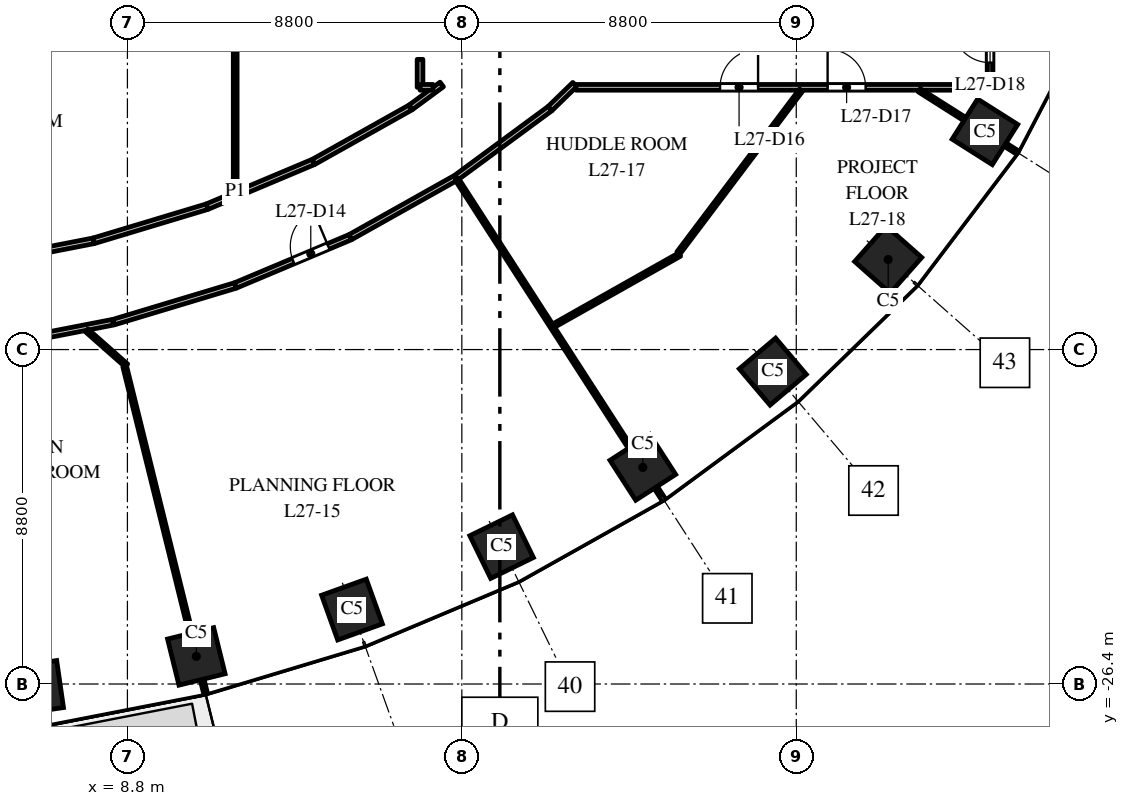
"""IFC4 building model, lengths in metres.
Left out: names, types, materials, properties, quantities, classifications, styles, units other than length and angle.
Written with IfcOpenShell. Run it as: python <this file> out.ifc"""

import sys

from ifc_helpers import new_model, si_unit, direction, frame, frame_2d, origin, origin_2d, place, context, subcontext, project, spatial, rectangle, extrude, element, fill, save


model = new_model("IFC4")
c1 = context("Model", 3, precision=1e-05, world=origin(), true_north=direction((0.0, 1.0)))
c2 = subcontext(c1, "Body", "Model", "MODEL_VIEW")
j1 = project(units=[si_unit("LENGTHUNIT", "METRE"), si_unit("PLANEANGLEUNIT", "RADIAN")], contexts=[c1])
p1 = place(None, origin())
s1 = spatial("IfcSite", under=j1, at=p1, CompositionType="ELEMENT")
p2 = place(p1, origin())
s2 = spatial("IfcBuilding", under=s1, at=p2, CompositionType="ELEMENT")
p3 = place(p2, frame((0.0, 0.0, 120.0)))
s3 = spatial("IfcBuildingStorey", under=s2, at=p3, CompositionType="ELEMENT", Elevation=120.0)
for number, where, z_axis, x_axis in (
    (1, (6.409, -26.491, 0.0), (0.0, 0.0, 1.0), (0.99, 0.143, 0.0)),
    (2, (10.613, -25.674, 0.0), (0.0, 0.0, 1.0), (0.971, 0.24, 0.0)),
    (3, (14.709, -24.441, 0.0), (0.0, 0.0, 1.0), (0.941, 0.338, 0.0)),
    (4, (18.646, -22.785, 0.0), (0.0, 0.0, 1.0), (0.898, 0.439, 0.0)),
    (5, (22.362, -20.7, 0.0), (0.0, 0.0, 1.0), (0.84, 0.542, 0.0)),
    (6, (25.783, -18.18, 0.0), (0.0, 0.0, 1.0), (0.763, 0.646, 0.0)),
    (7, (28.819, -15.23, 0.0), (0.0, 0.0, 1.0), (0.663, 0.749, 0.0)),
    (8, (31.365, -11.871, 0.0), (0.0, 0.0, 1.0), (0.535, 0.845, 0.0)),
):
    element("IfcColumn", number, at=place(p3, frame(where, z_axis=z_axis, x_axis=x_axis)), inside=s3, PredefinedType="COLUMN", context=c2, shape_type="SweptSolid", body=[
        extrude(rectangle(XDim=1.25, YDim=1.25, at=origin_2d()), origin(), (0.0, 0.0, 1.0), 4.0),
    ])
p4 = place(p3, frame((4.798, -15.344, 0.0), z_axis=(0.0, 0.0, 1.0), x_axis=(0.981588545092, 0.191007665145, 0.0)))
e9 = element("IfcWall", 9, at=p4, inside=s3, PredefinedType="PARTITIONING", context=c2, shape_type="SweptSolid", body=[
    extrude(rectangle(XDim=3.172, YDim=0.15, at=frame_2d((1.586, 0.0))), origin(), (0.0, 0.0, 1.0), 3.7),
])
p5 = place(p3, frame((5.113, -17.523, 0.0), z_axis=(0.0, 0.0, 1.0), x_axis=(0.981690354374, 0.19048372143, 0.0)))
e10 = element("IfcWall", 10, at=p5, inside=s3, PredefinedType="PARTITIONING", context=c2, shape_type="SweptSolid", body=[
    extrude(rectangle(XDim=3.37, YDim=0.15, at=frame_2d((1.685, 0.0))), origin(), (0.0, 0.0, 1.0), 3.7),
])
p6 = place(p3, frame((7.728, -17.095, 0.0), z_axis=(0.0, 0.0, 1.0), x_axis=(0.749403770292, -0.662113275106, 0.0)))
e11 = element("IfcWall", 11, at=p6, inside=s3, PredefinedType="PARTITIONING", context=c2, shape_type="SweptSolid", body=[
    extrude(rectangle(XDim=1.396, YDim=0.1, at=frame_2d((0.698, 0.0))), origin(), (0.0, 0.0, 1.0), 3.7),
])
p7 = place(p3, frame((7.912, -14.738, 0.0), z_axis=(0.0, 0.0, 1.0), x_axis=(0.957606118849, 0.28808075455, 0.0)))
e12 = element("IfcWall", 12, at=p7, inside=s3, PredefinedType="PARTITIONING", context=c2, shape_type="SweptSolid", body=[
    extrude(rectangle(XDim=3.117, YDim=0.15, at=frame_2d((1.559, 0.0))), origin(), (0.0, 0.0, 1.0), 2.85),
])
p8 = place(p3, frame((8.44, -16.877, 0.0), z_axis=(0.0, 0.0, 1.0), x_axis=(0.957584891346, 0.288151307243, 0.0)))
e13 = element("IfcWall", 13, at=p8, inside=s3, PredefinedType="PARTITIONING", context=c2, shape_type="SweptSolid", body=[
    extrude(rectangle(XDim=3.345, YDim=0.15, at=frame_2d((1.672, 0.0))), origin(), (0.0, 0.0, 1.0), 2.85),
])
p9 = place(p3, frame((8.729, -18.046, 0.0), z_axis=(0.0, 0.0, 1.0), x_axis=(0.240109518445, -0.970745805632, 0.0)))
e14 = element("IfcWall", 14, at=p9, inside=s3, PredefinedType="PARTITIONING", context=c2, shape_type="SweptSolid", body=[
    extrude(rectangle(XDim=8.858, YDim=0.1, at=frame_2d((4.429, 0.0))), origin(), (0.0, 0.0, 1.0), 2.9),
])
p10 = place(p3, frame((10.897, -13.84, 0.0), z_axis=(0.0, 0.0, 1.0), x_axis=(0.921751821358, 0.387780324183, 0.0)))
e15 = element("IfcWall", 15, at=p10, inside=s3, PredefinedType="PARTITIONING", context=c2, shape_type="SweptSolid", body=[
    extrude(rectangle(XDim=3.038, YDim=0.15, at=frame_2d((1.519, 0.0))), origin(), (0.0, 0.0, 1.0), 3.7),
])
p11 = place(p3, frame((11.636, -13.444, 0.0), z_axis=(0.0, 0.0, 1.0), x_axis=(0.0, 1.0, 0.0)))
e16 = element("IfcWall", 16, at=p11, inside=s3, PredefinedType="PARTITIONING", context=c2, shape_type="SweptSolid", body=[
    extrude(rectangle(XDim=26.888, YDim=0.1, at=frame_2d((13.444, 0.0))), origin(), (0.0, 0.0, 1.0), 2.75),
])
p12 = place(p3, frame((11.643, -15.913, 0.0), z_axis=(0.0, 0.0, 1.0), x_axis=(0.921789499058, 0.38769075231, 0.0)))
e17 = element("IfcWall", 17, at=p12, inside=s3, PredefinedType="PARTITIONING", context=c2, shape_type="SweptSolid", body=[
    extrude(rectangle(XDim=3.278, YDim=0.15, at=frame_2d((1.639, 0.0))), origin(), (0.0, 0.0, 1.0), 3.7),
])
p13 = place(p12, frame((1.65, 0.0, 0.0)))
e18 = element("IfcOpeningElement", 18, at=p13, cuts=e17, PredefinedType="OPENING", context=c2, shape_type="SweptSolid", body=[
    extrude(rectangle(XDim=1.0, YDim=2.1, at=frame_2d((0.5, 1.05))), frame((0.0, 0.085, 0.0), z_axis=(0.0, -1.0, 0.0), x_axis=(1.0, 0.0, 0.0)), (0.0, 0.0, 1.0), 0.17),
])
p14 = place(p3, frame((13.697, -12.662, 0.0), z_axis=(0.0, 0.0, 1.0), x_axis=(0.872147381065, 0.489243237767, 0.0)))
e19 = element("IfcWall", 19, at=p14, inside=s3, PredefinedType="PARTITIONING", context=c2, shape_type="SweptSolid", body=[
    extrude(rectangle(XDim=2.927, YDim=0.15, at=frame_2d((1.464, 0.0))), origin(), (0.0, 0.0, 1.0), 3.7),
])
p15 = place(p3, frame((14.665, -14.642, 0.0), z_axis=(0.0, 0.0, 1.0), x_axis=(0.871997056828, 0.4895111162, 0.0)))
e20 = element("IfcWall", 20, at=p15, inside=s3, PredefinedType="PARTITIONING", context=c2, shape_type="SweptSolid", body=[
    extrude(rectangle(XDim=3.168, YDim=0.15, at=frame_2d((1.584, 0.0))), origin(), (0.0, 0.0, 1.0), 3.7),
])
p16 = place(p3, frame((16.25, -11.23, 0.0), z_axis=(0.0, 0.0, 1.0), x_axis=(0.805055837353, 0.59319903805, 0.0)))
e21 = element("IfcWall", 21, at=p16, inside=s3, PredefinedType="PARTITIONING", context=c2, shape_type="SweptSolid", body=[
    extrude(rectangle(XDim=1.02, YDim=0.15, at=frame_2d((0.51, 0.0))), origin(), (0.0, 0.0, 1.0), 3.7),
])
p17 = place(p3, frame((16.5, -10.7, 0.0), z_axis=(0.0, 0.0, 1.0), x_axis=(0.0, 1.0, 0.0)))
e22 = element("IfcWall", 22, at=p17, inside=s3, PredefinedType="PARTITIONING", context=c2, shape_type="SweptSolid", body=[
    extrude(rectangle(XDim=0.736, YDim=0.15, at=frame_2d((0.368, 0.0))), origin(), (0.0, 0.0, 1.0), 3.7),
])
p18 = place(p3, frame((16.5, -10.7, 0.0), z_axis=(0.0, 0.0, 1.0), x_axis=(1.0, 0.0, 0.0)))
e23 = element("IfcWall", 23, at=p18, inside=s3, PredefinedType="PARTITIONING", context=c2, shape_type="SweptSolid", body=[
    extrude(rectangle(XDim=0.343, YDim=0.15, at=frame_2d((0.171, 0.0))), origin(), (0.0, 0.0, 1.0), 3.7),
])
p19 = place(p3, frame((17.447, -13.085, 0.0), z_axis=(0.0, 0.0, 1.0), x_axis=(0.542325736183, -0.840168314015, 0.0)))
e24 = element("IfcWall", 24, at=p19, inside=s3, PredefinedType="PARTITIONING", context=c2, shape_type="SweptSolid", body=[
    extrude(rectangle(XDim=10.066, YDim=0.1, at=frame_2d((5.033, 0.0))), origin(), (0.0, 0.0, 1.0), 3.7),
])
p20 = place(p3, frame((17.461, -13.07, 0.0), z_axis=(0.0, 0.0, 1.0), x_axis=(0.805228684186, 0.592964388613, 0.0)))
e25 = element("IfcWall", 25, at=p20, inside=s3, PredefinedType="PARTITIONING", context=c2, shape_type="SweptSolid", body=[
    extrude(rectangle(XDim=3.052, YDim=0.15, at=frame_2d((1.526, 0.0))), origin(), (0.0, 0.0, 1.0), 3.7),
])
p21 = place(p3, frame((19.919, -11.26, 0.0), z_axis=(0.0, 0.0, 1.0), x_axis=(0.716953986293, 0.697120492841, 0.0)))
e26 = element("IfcWall", 26, at=p21, inside=s3, PredefinedType="PARTITIONING", context=c2, shape_type="SweptSolid", body=[
    extrude(rectangle(XDim=0.911, YDim=0.15, at=frame_2d((0.456, 0.0))), origin(), (0.0, 0.0, 1.0), 2.75),
])
p22 = place(p3, frame((20.015, -16.97, 0.0), z_axis=(0.0, 0.0, 1.0), x_axis=(0.871018559545, 0.491250108324, 0.0)))
e27 = element("IfcWall", 27, at=p22, inside=s3, PredefinedType="PARTITIONING", context=c2, shape_type="SweptSolid", body=[
    extrude(rectangle(XDim=3.808, YDim=0.1, at=frame_2d((1.904, 0.0))), origin(), (0.0, 0.0, 1.0), 3.7),
])
p23 = place(p3, frame((20.603, -10.7, 0.0), z_axis=(0.0, 0.0, 1.0), x_axis=(1.0, 0.0, 0.0)))
e28 = element("IfcWall", 28, at=p23, inside=s3, PredefinedType="PARTITIONING", context=c2, shape_type="SweptSolid", body=[
    extrude(rectangle(XDim=10.897, YDim=0.15, at=frame_2d((5.448, 0.0))), origin(), (0.0, 0.0, 1.0), 2.9),
])
p24 = place(p23, frame((3.792, 0.0, 0.0)))
e29 = element("IfcOpeningElement", 29, at=p24, cuts=e28, PredefinedType="OPENING", context=c2, shape_type="SweptSolid", body=[
    extrude(rectangle(XDim=1.0, YDim=2.1, at=frame_2d((0.5, 1.05))), frame((0.0, 0.085, 0.0), z_axis=(0.0, -1.0, 0.0), x_axis=(1.0, 0.0, 0.0)), (0.0, 0.0, 1.0), 0.17),
])
p25 = place(p23, frame((6.622, 0.0, 0.0)))
e30 = element("IfcOpeningElement", 30, at=p25, cuts=e28, PredefinedType="OPENING", context=c2, shape_type="SweptSolid", body=[
    extrude(rectangle(XDim=1.0, YDim=2.1, at=frame_2d((0.5, 1.05))), frame((0.0, 0.085, 0.0), z_axis=(0.0, -1.0, 0.0), x_axis=(1.0, 0.0, 0.0)), (0.0, 0.0, 1.0), 0.17),
])
p26 = place(p3, frame((23.298, -15.06, 0.0), z_axis=(0.0, 0.0, 1.0), x_axis=(0.601658833238, 0.798753183647, 0.0)))
e31 = element("IfcWall", 31, at=p26, inside=s3, PredefinedType="PARTITIONING", context=c2, shape_type="SweptSolid", body=[
    extrude(rectangle(XDim=5.365, YDim=0.1, at=frame_2d((2.682, 0.0))), origin(), (0.0, 0.0, 1.0), 2.75),
])
p27 = place(p3, frame((29.637, -10.777, 0.0), z_axis=(0.0, 0.0, 1.0), x_axis=(0.844810627195, -0.535065420467, 0.0)))
e32 = element("IfcWall", 32, at=p27, inside=s3, PredefinedType="PARTITIONING", context=c2, shape_type="SweptSolid", body=[
    extrude(rectangle(XDim=3.048, YDim=0.1, at=frame_2d((1.524, 0.0))), origin(), (0.0, 0.0, 1.0), 2.9),
])
p28 = place(p3, frame((31.5, -10.7, 0.0), z_axis=(0.0, 0.0, 1.0), x_axis=(0.0, 1.0, 0.0)))
e33 = element("IfcWall", 33, at=p28, inside=s3, PredefinedType="PARTITIONING", context=c2, shape_type="SweptSolid", body=[
    extrude(rectangle(XDim=2.2, YDim=0.15, at=frame_2d((1.1, 0.0))), origin(), (0.0, 0.0, 1.0), 2.9),
])
p29 = place(p28, frame((0.65, 0.0, 0.0)))
e34 = element("IfcOpeningElement", 34, at=p29, cuts=e33, PredefinedType="OPENING", context=c2, shape_type="SweptSolid", body=[
    extrude(rectangle(XDim=1.0, YDim=2.1, at=frame_2d((0.5, 1.05))), frame((0.0, 0.085, 0.0), z_axis=(0.0, -1.0, 0.0), x_axis=(1.0, 0.0, 0.0)), (0.0, 0.0, 1.0), 0.17),
])
p30 = place(p13, origin())
e35 = element("IfcDoor", 35, at=p30, inside=s3, OperationType="SINGLE_SWING_RIGHT", PredefinedType="DOOR", context=c2, shape_type="SweptSolid", body=[
    extrude(rectangle(XDim=1.0, YDim=2.1, at=frame_2d((0.5, 1.05))), frame((0.0, 0.025, 0.0), z_axis=(0.0, -1.0, 0.0), x_axis=(1.0, 0.0, 0.0)), (0.0, 0.0, 1.0), 0.05),
])
fill(e18, e35)
p31 = place(p24, origin())
e36 = element("IfcDoor", 36, at=p31, inside=s3, OperationType="SINGLE_SWING_RIGHT", PredefinedType="DOOR", context=c2, shape_type="SweptSolid", body=[
    extrude(rectangle(XDim=1.0, YDim=2.1, at=frame_2d((0.5, 1.05))), frame((0.0, 0.025, 0.0), z_axis=(0.0, -1.0, 0.0), x_axis=(1.0, 0.0, 0.0)), (0.0, 0.0, 1.0), 0.05),
])
fill(e29, e36)
p32 = place(p25, origin())
e37 = element("IfcDoor", 37, at=p32, inside=s3, OperationType="SINGLE_SWING_LEFT", PredefinedType="DOOR", context=c2, shape_type="SweptSolid", body=[
    extrude(rectangle(XDim=1.0, YDim=2.1, at=frame_2d((0.5, 1.05))), frame((0.0, 0.025, 0.0), z_axis=(0.0, -1.0, 0.0), x_axis=(1.0, 0.0, 0.0)), (0.0, 0.0, 1.0), 0.05),
])
fill(e30, e37)
p33 = place(p29, origin())
e38 = element("IfcDoor", 38, at=p33, inside=s3, OperationType="SINGLE_SWING_RIGHT", PredefinedType="DOOR", context=c2, shape_type="SweptSolid", body=[
    extrude(rectangle(XDim=1.0, YDim=2.1, at=frame_2d((0.5, 1.05))), frame((0.0, 0.025, 0.0), z_axis=(0.0, -1.0, 0.0), x_axis=(1.0, 0.0, 0.0)), (0.0, 0.0, 1.0), 0.05),
])
fill(e34, e38)
save(model, sys.argv[1])
